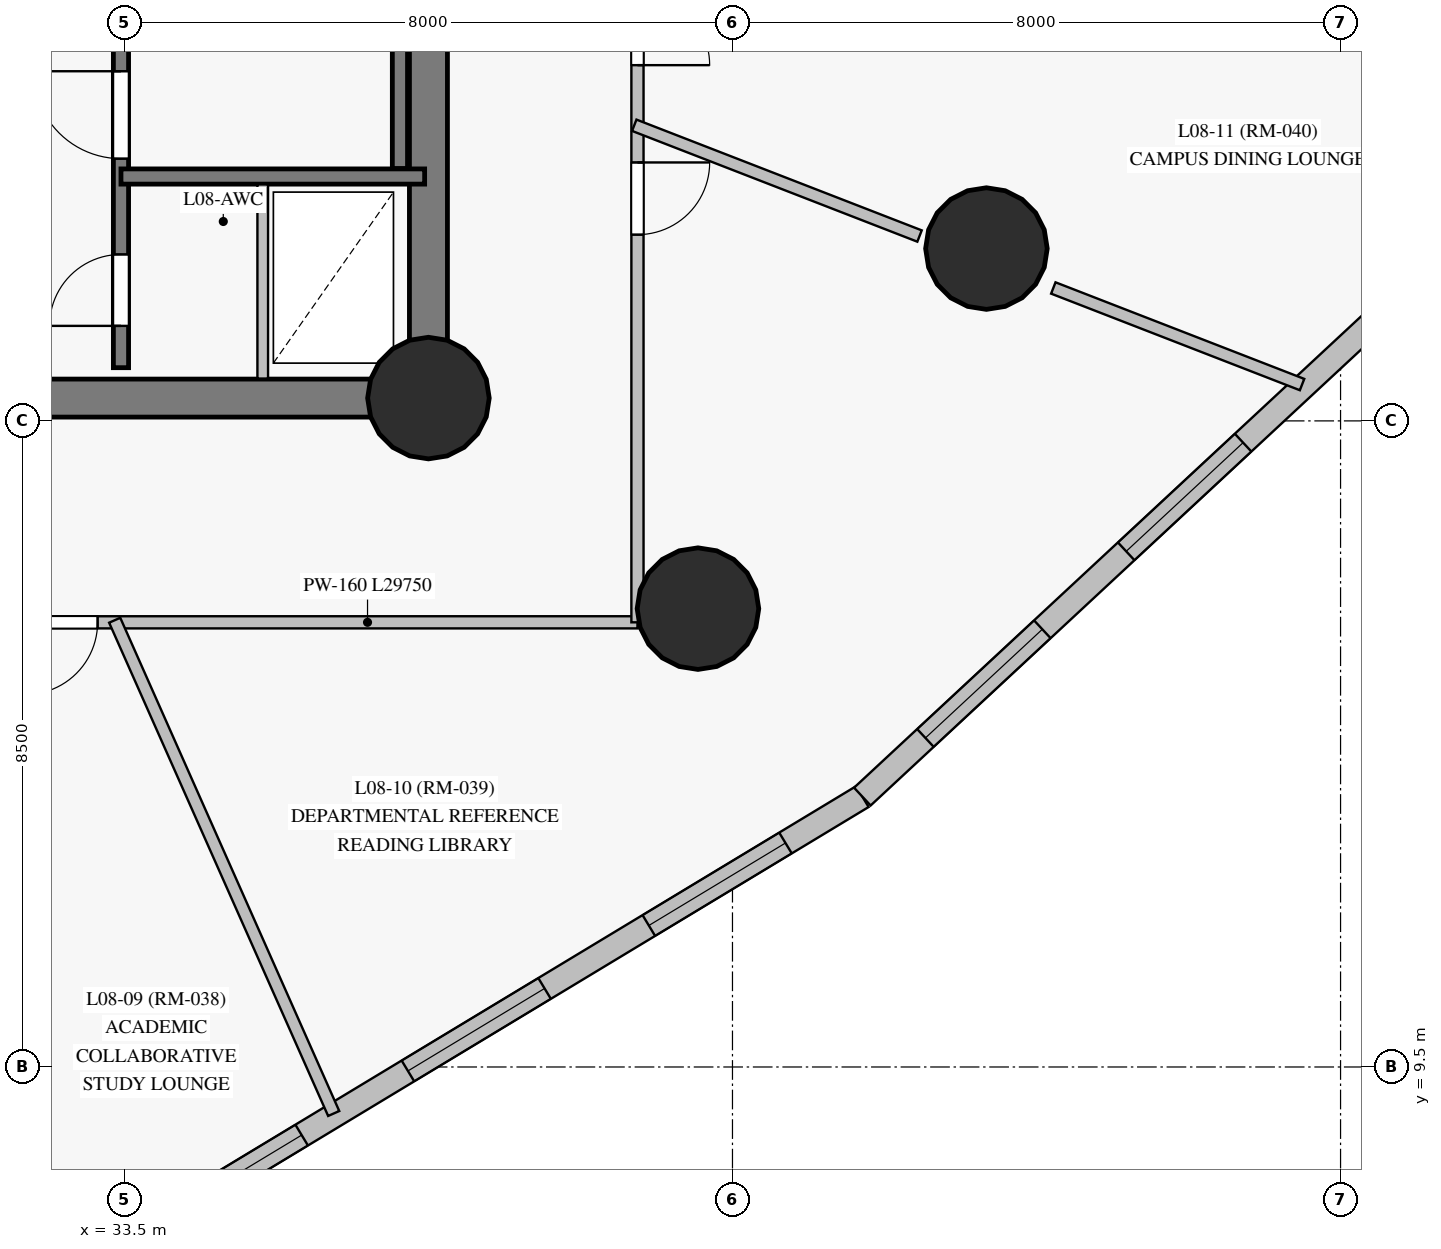
"""IFC4 building model, lengths in metres.
Left out: names, types, materials, properties, quantities, classifications, styles, units other than length and angle.
Written with IfcOpenShell. Run it as: python <this file> out.ifc"""

import sys

from ifc_helpers import new_model, si_unit, direction, frame, frame_2d, origin, origin_with_axes, origin_2d, place, context, subcontext, project, spatial, rectangle, circle, extrude, source, transform, mapped, element, fill, save


model = new_model("IFC4")
c1 = context("Model", 3, precision=1e-05, world=origin(), true_north=direction((0.0, 1.0)))
c2 = subcontext(c1, "Body", "Model", "MODEL_VIEW")
j1 = project(units=[si_unit("LENGTHUNIT", "METRE"), si_unit("PLANEANGLEUNIT", "RADIAN")], contexts=[c1])
p1 = place(None, origin())
s1 = spatial("IfcSite", under=j1, at=p1, CompositionType="ELEMENT")
p2 = place(p1, origin())
s2 = spatial("IfcBuilding", under=s1, at=p2, CompositionType="ELEMENT")
p3 = place(p2, frame((0.0, 0.0, 33.7)))
s3 = spatial("IfcBuildingStorey", under=s2, at=p3, CompositionType="ELEMENT", Elevation=33.7)
p4 = place(p3, frame((26.55, 18.3, 0.0), z_axis=(0.0, 0.0, 1.0), x_axis=(1.0, 0.0, 0.0)))
e1 = element("IfcWall", 1, at=p4, inside=s3, PredefinedType="SHEAR", context=c2, shape_type="SweptSolid", body=[
    extrude(rectangle(XDim=10.95, YDim=0.5, at=frame_2d((5.475, 0.0))), origin(), (0.0, 0.0, 1.0), 3.35),
])
p5 = place(p4, frame((4.55, 0.0, 0.0)))
e2 = element("IfcOpeningElement", 2, at=p5, cuts=e1, PredefinedType="OPENING", context=c2, shape_type="SweptSolid", body=[
    extrude(rectangle(XDim=1.4, YDim=2.2, at=frame_2d((0.7, 1.1))), frame((0.0, 0.26, 0.0), z_axis=(0.0, -1.0, 0.0), x_axis=(1.0, 0.0, 0.0)), (0.0, 0.0, 1.0), 0.52),
])
p6 = place(p3, frame((37.5, 18.3, 0.0), z_axis=(0.0, 0.0, 1.0), x_axis=(0.0, 1.0, 0.0)))
e3 = element("IfcWall", 3, at=p6, inside=s3, PredefinedType="SHEAR", context=c2, shape_type="SweptSolid", body=[
    extrude(rectangle(XDim=16.4, YDim=0.5, at=frame_2d((8.2, 0.0))), origin(), (0.0, 0.0, 1.0), 3.35),
])
p7 = place(p6, frame((14.06, 0.0, 0.0)))
e4 = element("IfcOpeningElement", 4, at=p7, cuts=e3, PredefinedType="OPENING", context=c2, shape_type="SweptSolid", body=[
    extrude(rectangle(XDim=1.2, YDim=2.15, at=frame_2d((0.6, 1.075))), frame((0.0, 0.26, 0.0), z_axis=(0.0, -1.0, 0.0), x_axis=(1.0, 0.0, 0.0)), (0.0, 0.0, 1.0), 0.52),
])
m1 = source(origin_with_axes(), c2, "Body", "SweptSolid", [
    extrude(circle(Radius=0.8, at=origin_2d()), origin(), (0.0, 0.0, 1.0), 3.6),
])
for number, where, z_axis, x_axis in (
    (5, (37.5, 18.3, 0.0), (0.0, 0.0, 1.0), (1.0, 0.0, 0.0)),
    (6, (44.841, 20.267, 0.0), (0.0, 0.0, 1.0), (1.0, 0.0, 0.0)),
    (7, (41.046, 15.53, 0.0), (0.0, 0.0, 1.0), (1.0, 0.0, 0.0)),
):
    element("IfcColumn", number, at=place(p3, frame(where, z_axis=z_axis, x_axis=x_axis)), inside=s3, PredefinedType="COLUMN", context=c2, shape_type="MappedRepresentation", body=[
        mapped(m1, transform((0.0, 0.0, 0.0), scale=1.0)),
    ])
p8 = place(p3, frame((33.545, 7.223, 0.0), z_axis=(0.0, 0.0, 1.0), x_axis=(0.8560794316, 0.51684427712, 0.0)))
e8 = element("IfcWall", 8, at=p8, inside=s3, PredefinedType="SOLIDWALL", context=c2, shape_type="SweptSolid", body=[
    extrude(rectangle(XDim=11.288, YDim=0.32, at=frame_2d((5.644, 0.0))), origin(), (0.0, 0.0, 1.0), 3.35),
])
p9 = place(p8, frame((0.572, 0.0, 0.85)))
e9 = element("IfcOpeningElement", 9, at=p9, cuts=e8, PredefinedType="OPENING", context=c2, shape_type="SweptSolid", body=[
    extrude(rectangle(XDim=2.1, YDim=1.95, at=frame_2d((1.05, 0.975))), frame((0.0, 0.17, 0.0), z_axis=(0.0, -1.0, 0.0), x_axis=(1.0, 0.0, 0.0)), (0.0, 0.0, 1.0), 0.34),
])
p10 = place(p8, frame((4.305, 0.0, 0.85)))
e10 = element("IfcOpeningElement", 10, at=p10, cuts=e8, PredefinedType="OPENING", context=c2, shape_type="SweptSolid", body=[
    extrude(rectangle(XDim=2.1, YDim=1.95, at=frame_2d((1.05, 0.975))), frame((0.0, 0.17, 0.0), z_axis=(0.0, -1.0, 0.0), x_axis=(1.0, 0.0, 0.0)), (0.0, 0.0, 1.0), 0.34),
])
p11 = place(p8, frame((8.007, 0.0, 0.85)))
e11 = element("IfcOpeningElement", 11, at=p11, cuts=e8, PredefinedType="OPENING", context=c2, shape_type="SweptSolid", body=[
    extrude(rectangle(XDim=2.1, YDim=1.95, at=frame_2d((1.05, 0.975))), frame((0.0, 0.17, 0.0), z_axis=(0.0, -1.0, 0.0), x_axis=(1.0, 0.0, 0.0)), (0.0, 0.0, 1.0), 0.34),
])
p12 = place(p3, frame((43.208, 13.057, 0.0), z_axis=(0.0, 0.0, 1.0), x_axis=(0.732423224096, 0.680849631567, 0.0)))
e12 = element("IfcWall", 12, at=p12, inside=s3, PredefinedType="SOLIDWALL", context=c2, shape_type="SweptSolid", body=[
    extrude(rectangle(XDim=16.232, YDim=0.32, at=frame_2d((8.116, 0.0))), origin(), (0.0, 0.0, 1.0), 3.35),
])
p13 = place(p12, frame((1.133, 0.0, 0.85)))
e13 = element("IfcOpeningElement", 13, at=p13, cuts=e12, PredefinedType="OPENING", context=c2, shape_type="SweptSolid", body=[
    extrude(rectangle(XDim=2.1, YDim=1.95, at=frame_2d((1.05, 0.975))), frame((0.0, 0.17, 0.0), z_axis=(0.0, -1.0, 0.0), x_axis=(1.0, 0.0, 0.0)), (0.0, 0.0, 1.0), 0.34),
])
p14 = place(p12, frame((4.74, 0.0, 0.85)))
e14 = element("IfcOpeningElement", 14, at=p14, cuts=e12, PredefinedType="OPENING", context=c2, shape_type="SweptSolid", body=[
    extrude(rectangle(XDim=2.1, YDim=1.95, at=frame_2d((1.05, 0.975))), frame((0.0, 0.17, 0.0), z_axis=(0.0, -1.0, 0.0), x_axis=(1.0, 0.0, 0.0)), (0.0, 0.0, 1.0), 0.34),
])
p15 = place(p12, frame((10.53, 0.0, 0.85)))
e15 = element("IfcOpeningElement", 15, at=p15, cuts=e12, PredefinedType="OPENING", context=c2, shape_type="SweptSolid", body=[
    extrude(rectangle(XDim=2.1, YDim=1.95, at=frame_2d((1.05, 0.975))), frame((0.0, 0.17, 0.0), z_axis=(0.0, -1.0, 0.0), x_axis=(1.0, 0.0, 0.0)), (0.0, 0.0, 1.0), 0.34),
])
p16 = place(p3, frame((33.455, 18.7, 0.0), z_axis=(0.0, 0.0, 1.0), x_axis=(0.0, 1.0, 0.0)))
e16 = element("IfcWall", 16, at=p16, inside=s3, PredefinedType="SHEAR", context=c2, shape_type="SweptSolid", body=[
    extrude(rectangle(XDim=15.6, YDim=0.2, at=frame_2d((7.8, 0.0))), origin(), (0.0, 0.0, 1.0), 3.35),
])
p17 = place(p16, frame((2.75, 0.0, 0.0)))
e17 = element("IfcOpeningElement", 17, at=p17, cuts=e16, PredefinedType="OPENING", context=c2, shape_type="SweptSolid", body=[
    extrude(rectangle(XDim=1.15, YDim=2.15, at=frame_2d((0.575, 1.075))), frame((0.0, 0.11, 0.0), z_axis=(0.0, -1.0, 0.0), x_axis=(1.0, 0.0, 0.0)), (0.0, 0.0, 1.0), 0.22),
])
p18 = place(p16, frame((0.55, 0.0, 0.0)))
e18 = element("IfcOpeningElement", 18, at=p18, cuts=e16, PredefinedType="OPENING", context=c2, shape_type="SweptSolid", body=[
    extrude(rectangle(XDim=0.94, YDim=2.1, at=frame_2d((0.47, 1.05))), frame((0.0, 0.11, 0.0), z_axis=(0.0, -1.0, 0.0), x_axis=(1.0, 0.0, 0.0)), (0.0, 0.0, 1.0), 0.22),
])
p19 = place(p3, frame((37.125, 21.32, 0.0), z_axis=(0.0, 0.0, 1.0), x_axis=(0.0, 1.0, 0.0)))
e19 = element("IfcWall", 19, at=p19, inside=s3, PredefinedType="SHEAR", context=c2, shape_type="SweptSolid", body=[
    extrude(rectangle(XDim=7.5, YDim=0.2, at=frame_2d((3.75, 0.0))), origin(), (0.0, 0.0, 1.0), 3.35),
])
p20 = place(p3, frame((33.455, 21.215, 0.0), z_axis=(0.0, 0.0, 1.0), x_axis=(1.0, 0.0, 0.0)))
e20 = element("IfcWall", 20, at=p20, inside=s3, PredefinedType="SHEAR", context=c2, shape_type="SweptSolid", body=[
    extrude(rectangle(XDim=3.995, YDim=0.2, at=frame_2d((1.998, 0.0))), origin(), (0.0, 0.0, 1.0), 3.35),
])
p21 = place(p3, frame((40.25, 15.35, 0.0), z_axis=(0.0, 0.0, 1.0), x_axis=(-1.0, 0.0, 0.0)))
e21 = element("IfcWall", 21, at=p21, inside=s3, PredefinedType="PARTITIONING", context=c2, shape_type="SweptSolid", body=[
    extrude(rectangle(XDim=29.75, YDim=0.16, at=frame_2d((14.875, 0.0))), origin(), (0.0, 0.0, 1.0), 2.7),
])
p22 = place(p21, frame((25.925, 0.0, 0.0)))
e22 = element("IfcOpeningElement", 22, at=p22, cuts=e21, PredefinedType="OPENING", context=c2, shape_type="SweptSolid", body=[
    extrude(rectangle(XDim=0.95, YDim=2.15, at=frame_2d((0.475, 1.075))), frame((0.0, 0.09, 0.0), z_axis=(0.0, -1.0, 0.0), x_axis=(1.0, 0.0, 0.0)), (0.0, 0.0, 1.0), 0.18),
])
p23 = place(p21, frame((21.748, 0.0, 0.0)))
e23 = element("IfcOpeningElement", 23, at=p23, cuts=e21, PredefinedType="OPENING", context=c2, shape_type="SweptSolid", body=[
    extrude(rectangle(XDim=0.95, YDim=2.15, at=frame_2d((0.475, 1.075))), frame((0.0, 0.09, 0.0), z_axis=(0.0, -1.0, 0.0), x_axis=(1.0, 0.0, 0.0)), (0.0, 0.0, 1.0), 0.18),
])
p24 = place(p21, frame((18.423, 0.0, 0.0)))
e24 = element("IfcOpeningElement", 24, at=p24, cuts=e21, PredefinedType="OPENING", context=c2, shape_type="SweptSolid", body=[
    extrude(rectangle(XDim=0.95, YDim=2.15, at=frame_2d((0.475, 1.075))), frame((0.0, 0.09, 0.0), z_axis=(0.0, -1.0, 0.0), x_axis=(1.0, 0.0, 0.0)), (0.0, 0.0, 1.0), 0.18),
])
p25 = place(p21, frame((15.67, 0.0, 0.0)))
e25 = element("IfcOpeningElement", 25, at=p25, cuts=e21, PredefinedType="OPENING", context=c2, shape_type="SweptSolid", body=[
    extrude(rectangle(XDim=0.95, YDim=2.15, at=frame_2d((0.475, 1.075))), frame((0.0, 0.09, 0.0), z_axis=(0.0, -1.0, 0.0), x_axis=(1.0, 0.0, 0.0)), (0.0, 0.0, 1.0), 0.18),
])
p26 = place(p21, frame((13.96, 0.0, 0.0)))
e26 = element("IfcOpeningElement", 26, at=p26, cuts=e21, PredefinedType="OPENING", context=c2, shape_type="SweptSolid", body=[
    extrude(rectangle(XDim=0.95, YDim=2.15, at=frame_2d((0.475, 1.075))), frame((0.0, 0.09, 0.0), z_axis=(0.0, -1.0, 0.0), x_axis=(1.0, 0.0, 0.0)), (0.0, 0.0, 1.0), 0.18),
])
p27 = place(p21, frame((9.938, 0.0, 0.0)))
e27 = element("IfcOpeningElement", 27, at=p27, cuts=e21, PredefinedType="OPENING", context=c2, shape_type="SweptSolid", body=[
    extrude(rectangle(XDim=0.95, YDim=2.15, at=frame_2d((0.475, 1.075))), frame((0.0, 0.09, 0.0), z_axis=(0.0, -1.0, 0.0), x_axis=(1.0, 0.0, 0.0)), (0.0, 0.0, 1.0), 0.18),
])
p28 = place(p21, frame((7.103, 0.0, 0.0)))
e28 = element("IfcOpeningElement", 28, at=p28, cuts=e21, PredefinedType="OPENING", context=c2, shape_type="SweptSolid", body=[
    extrude(rectangle(XDim=0.95, YDim=2.15, at=frame_2d((0.475, 1.075))), frame((0.0, 0.09, 0.0), z_axis=(0.0, -1.0, 0.0), x_axis=(1.0, 0.0, 0.0)), (0.0, 0.0, 1.0), 0.18),
])
p29 = place(p3, frame((40.25, 37.65, 0.0), z_axis=(0.0, 0.0, 1.0), x_axis=(0.0, -1.0, 0.0)))
e29 = element("IfcWall", 29, at=p29, inside=s3, PredefinedType="PARTITIONING", context=c2, shape_type="SweptSolid", body=[
    extrude(rectangle(XDim=22.3, YDim=0.16, at=frame_2d((11.15, 0.0))), origin(), (0.0, 0.0, 1.0), 2.75),
])
p30 = place(p29, frame((16.25, 0.0, 0.0)))
e30 = element("IfcOpeningElement", 30, at=p30, cuts=e29, PredefinedType="OPENING", context=c2, shape_type="SweptSolid", body=[
    extrude(rectangle(XDim=0.95, YDim=2.15, at=frame_2d((0.475, 1.075))), frame((0.0, 0.09, 0.0), z_axis=(0.0, -1.0, 0.0), x_axis=(1.0, 0.0, 0.0)), (0.0, 0.0, 1.0), 0.18),
])
p31 = place(p29, frame((14.02, 0.0, 0.0)))
e31 = element("IfcOpeningElement", 31, at=p31, cuts=e29, PredefinedType="OPENING", context=c2, shape_type="SweptSolid", body=[
    extrude(rectangle(XDim=0.95, YDim=2.15, at=frame_2d((0.475, 1.075))), frame((0.0, 0.09, 0.0), z_axis=(0.0, -1.0, 0.0), x_axis=(1.0, 0.0, 0.0)), (0.0, 0.0, 1.0), 0.18),
])
p32 = place(p29, frame((11.165, 0.0, 0.0)))
e32 = element("IfcOpeningElement", 32, at=p32, cuts=e29, PredefinedType="OPENING", context=c2, shape_type="SweptSolid", body=[
    extrude(rectangle(XDim=0.95, YDim=2.15, at=frame_2d((0.475, 1.075))), frame((0.0, 0.09, 0.0), z_axis=(0.0, -1.0, 0.0), x_axis=(1.0, 0.0, 0.0)), (0.0, 0.0, 1.0), 0.18),
])
p33 = place(p29, frame((9.341, 0.0, 0.0)))
e33 = element("IfcOpeningElement", 33, at=p33, cuts=e29, PredefinedType="OPENING", context=c2, shape_type="SweptSolid", body=[
    extrude(rectangle(XDim=0.95, YDim=2.15, at=frame_2d((0.475, 1.075))), frame((0.0, 0.09, 0.0), z_axis=(0.0, -1.0, 0.0), x_axis=(1.0, 0.0, 0.0)), (0.0, 0.0, 1.0), 0.18),
])
p34 = place(p29, frame((7.62, 0.0, 0.0)))
e34 = element("IfcOpeningElement", 34, at=p34, cuts=e29, PredefinedType="OPENING", context=c2, shape_type="SweptSolid", body=[
    extrude(rectangle(XDim=0.95, YDim=2.15, at=frame_2d((0.475, 1.075))), frame((0.0, 0.09, 0.0), z_axis=(0.0, -1.0, 0.0), x_axis=(1.0, 0.0, 0.0)), (0.0, 0.0, 1.0), 0.18),
])
p35 = place(p29, frame((5.59, 0.0, 0.0)))
e35 = element("IfcOpeningElement", 35, at=p35, cuts=e29, PredefinedType="OPENING", context=c2, shape_type="SweptSolid", body=[
    extrude(rectangle(XDim=0.95, YDim=2.15, at=frame_2d((0.475, 1.075))), frame((0.0, 0.09, 0.0), z_axis=(0.0, -1.0, 0.0), x_axis=(1.0, 0.0, 0.0)), (0.0, 0.0, 1.0), 0.18),
])
p36 = place(p29, frame((3.591, 0.0, 0.0)))
e36 = element("IfcOpeningElement", 36, at=p36, cuts=e29, PredefinedType="OPENING", context=c2, shape_type="SweptSolid", body=[
    extrude(rectangle(XDim=0.95, YDim=2.15, at=frame_2d((0.475, 1.075))), frame((0.0, 0.09, 0.0), z_axis=(0.0, -1.0, 0.0), x_axis=(1.0, 0.0, 0.0)), (0.0, 0.0, 1.0), 0.18),
])
p37 = place(p29, frame((0.895, 0.0, 0.0)))
e37 = element("IfcOpeningElement", 37, at=p37, cuts=e29, PredefinedType="OPENING", context=c2, shape_type="SweptSolid", body=[
    extrude(rectangle(XDim=0.95, YDim=2.15, at=frame_2d((0.475, 1.075))), frame((0.0, 0.09, 0.0), z_axis=(0.0, -1.0, 0.0), x_axis=(1.0, 0.0, 0.0)), (0.0, 0.0, 1.0), 0.18),
])
p38 = place(p3, frame((30.82, 15.379, 0.0), z_axis=(0.0, 0.0, 1.0), x_axis=(0.20933229931, -0.977844562528, 0.0)))
e38 = element("IfcWall", 38, at=p38, inside=s3, PredefinedType="PARTITIONING", context=c2, shape_type="SweptSolid", body=[
    extrude(rectangle(XDim=8.642, YDim=0.16, at=frame_2d((4.321, 0.0))), origin(), (0.0, 0.0, 1.0), 3.35),
])
p39 = place(p3, frame((33.373, 15.377, 0.0), z_axis=(0.0, 0.0, 1.0), x_axis=(0.40578429947, -0.913968873816, 0.0)))
e39 = element("IfcWall", 39, at=p39, inside=s3, PredefinedType="PARTITIONING", context=c2, shape_type="SweptSolid", body=[
    extrude(rectangle(XDim=7.1, YDim=0.16, at=frame_2d((3.55, 0.0))), origin(), (0.0, 0.0, 1.0), 3.35),
])
p40 = place(p3, frame((40.208, 21.889, 0.0), z_axis=(0.0, 0.0, 1.0), x_axis=(0.932188915671, -0.361972133596, 0.0)))
e40 = element("IfcWall", 40, at=p40, inside=s3, PredefinedType="PARTITIONING", context=c2, shape_type="SweptSolid", body=[
    extrude(rectangle(XDim=4.026, YDim=0.16, at=frame_2d((2.013, 0.0))), origin(), (0.0, 0.0, 1.0), 2.7),
])
p41 = place(p3, frame((45.721, 19.749, 0.0), z_axis=(0.0, 0.0, 1.0), x_axis=(0.932193777392, -0.36195961293, 0.0)))
e41 = element("IfcWall", 41, at=p41, inside=s3, PredefinedType="PARTITIONING", context=c2, shape_type="SweptSolid", body=[
    extrude(rectangle(XDim=3.511, YDim=0.16, at=frame_2d((1.755, 0.0))), origin(), (0.0, 0.0, 1.0), 3.35),
])
p42 = place(p3, frame((35.32, 18.557, 0.0), z_axis=(0.0, 0.0, 1.0), x_axis=(0.0, 1.0, 0.0)))
e42 = element("IfcWall", 42, at=p42, inside=s3, PredefinedType="PARTITIONING", context=c2, shape_type="SweptSolid", body=[
    extrude(rectangle(XDim=2.553, YDim=0.14, at=frame_2d((1.277, 0.0))), origin(), (0.0, 0.0, 1.0), 3.35),
])
m2 = source(origin_with_axes(), c2, "Body", "SweptSolid", [
    extrude(rectangle(XDim=2.1, YDim=1.95, at=frame_2d((1.05, 0.975))), frame((0.0, 0.03, 0.0), z_axis=(0.0, -1.0, 0.0), x_axis=(1.0, 0.0, 0.0)), (0.0, 0.0, 1.0), 0.06),
])
p43 = place(p9, origin())
e43 = element("IfcWindow", 43, at=p43, inside=s3, PartitioningType="SINGLE_PANEL", PredefinedType="WINDOW", context=c2, shape_type="MappedRepresentation", body=[
    mapped(m2, transform((0.0, 0.0, 0.0), scale=1.0)),
])
fill(e9, e43)
p44 = place(p10, origin())
e44 = element("IfcWindow", 44, at=p44, inside=s3, PartitioningType="SINGLE_PANEL", PredefinedType="WINDOW", context=c2, shape_type="MappedRepresentation", body=[
    mapped(m2, transform((0.0, 0.0, 0.0), scale=1.0)),
])
fill(e10, e44)
p45 = place(p11, origin())
e45 = element("IfcWindow", 45, at=p45, inside=s3, PartitioningType="SINGLE_PANEL", PredefinedType="WINDOW", context=c2, shape_type="MappedRepresentation", body=[
    mapped(m2, transform((0.0, 0.0, 0.0), scale=1.0)),
])
fill(e11, e45)
p46 = place(p13, origin())
e46 = element("IfcWindow", 46, at=p46, inside=s3, PartitioningType="SINGLE_PANEL", PredefinedType="WINDOW", context=c2, shape_type="MappedRepresentation", body=[
    mapped(m2, transform((0.0, 0.0, 0.0), scale=1.0)),
])
fill(e13, e46)
p47 = place(p14, origin())
e47 = element("IfcWindow", 47, at=p47, inside=s3, PartitioningType="SINGLE_PANEL", PredefinedType="WINDOW", context=c2, shape_type="MappedRepresentation", body=[
    mapped(m2, transform((0.0, 0.0, 0.0), scale=1.0)),
])
fill(e14, e47)
m3 = source(origin_with_axes(), c2, "Body", "SweptSolid", [
    extrude(rectangle(XDim=1.15, YDim=2.15, at=frame_2d((0.575, 1.075))), frame((0.0, 0.025, 0.0), z_axis=(0.0, -1.0, 0.0), x_axis=(1.0, 0.0, 0.0)), (0.0, 0.0, 1.0), 0.05),
])
p48 = place(p17, origin())
e48 = element("IfcDoor", 48, at=p48, inside=s3, OperationType="SINGLE_SWING_RIGHT", PredefinedType="DOOR", context=c2, shape_type="MappedRepresentation", body=[
    mapped(m3, transform((0.0, 0.0, 0.0), scale=1.0)),
])
fill(e17, e48)
m4 = source(origin_with_axes(), c2, "Body", "SweptSolid", [
    extrude(rectangle(XDim=0.94, YDim=2.1, at=frame_2d((0.47, 1.05))), frame((0.0, 0.025, 0.0), z_axis=(0.0, -1.0, 0.0), x_axis=(1.0, 0.0, 0.0)), (0.0, 0.0, 1.0), 0.05),
])
p49 = place(p18, origin())
e49 = element("IfcDoor", 49, at=p49, inside=s3, OperationType="SINGLE_SWING_LEFT", PredefinedType="DOOR", context=c2, shape_type="MappedRepresentation", body=[
    mapped(m4, transform((0.0, 0.0, 0.0), scale=1.0)),
])
fill(e18, e49)
m5 = source(origin_with_axes(), c2, "Body", "SweptSolid", [
    extrude(rectangle(XDim=0.95, YDim=2.15, at=frame_2d((0.475, 1.075))), frame((0.0, 0.025, 0.0), z_axis=(0.0, -1.0, 0.0), x_axis=(1.0, 0.0, 0.0)), (0.0, 0.0, 1.0), 0.05),
])
p50 = place(p28, origin())
e50 = element("IfcDoor", 50, at=p50, inside=s3, OperationType="SINGLE_SWING_RIGHT", PredefinedType="DOOR", context=c2, shape_type="MappedRepresentation", body=[
    mapped(m5, transform((0.0, 0.0, 0.0), scale=1.0)),
])
fill(e28, e50)
p51 = place(p30, origin())
e51 = element("IfcDoor", 51, at=p51, inside=s3, OperationType="SINGLE_SWING_LEFT", PredefinedType="DOOR", context=c2, shape_type="MappedRepresentation", body=[
    mapped(m5, transform((0.0, 0.0, 0.0), scale=1.0)),
])
fill(e30, e51)
p52 = place(p31, origin())
e52 = element("IfcDoor", 52, at=p52, inside=s3, OperationType="SINGLE_SWING_RIGHT", PredefinedType="DOOR", context=c2, shape_type="MappedRepresentation", body=[
    mapped(m5, transform((0.0, 0.0, 0.0), scale=1.0)),
])
fill(e31, e52)
save(model, sys.argv[1])
